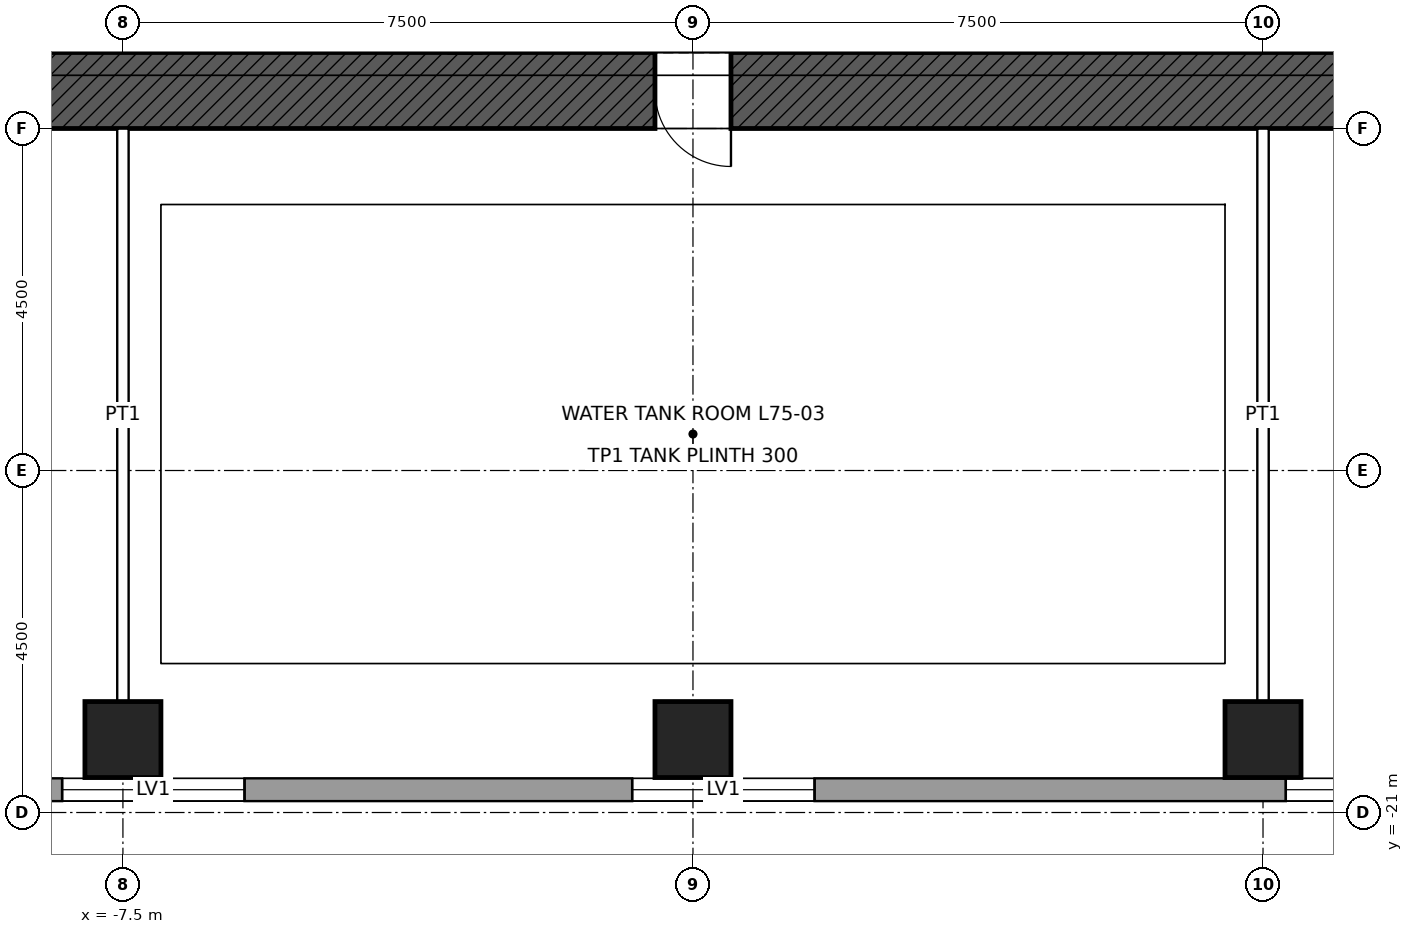
"""IFC4 building model, lengths in metres.
Left out: names, types, materials, properties, quantities, classifications, styles, units other than length and angle.
Written with IfcOpenShell. Run it as: python <this file> out.ifc"""

import sys

from ifc_helpers import new_model, si_unit, direction, frame, frame_2d, origin, origin_2d, place, context, subcontext, project, spatial, rectangle, hollow_rectangle, extrude, element, fill, save


model = new_model("IFC4")
c1 = context("Model", 3, precision=1e-05, world=origin(), true_north=direction((0.0, 1.0)))
c2 = subcontext(c1, "Body", "Model", "MODEL_VIEW")
j1 = project(units=[si_unit("LENGTHUNIT", "METRE"), si_unit("PLANEANGLEUNIT", "RADIAN")], contexts=[c1])
p1 = place(None, origin())
s1 = spatial("IfcSite", under=j1, at=p1, CompositionType="ELEMENT")
p2 = place(p1, origin())
s2 = spatial("IfcBuilding", under=s1, at=p2, CompositionType="ELEMENT")
p3 = place(p2, frame((0.0, 0.0, 335.9)))
s3 = spatial("IfcBuildingStorey", under=s2, at=p3, CompositionType="ELEMENT", Elevation=335.9)
for number, where, z_axis, x_axis in (
    (1, (7.5, -20.04, 0.0), (0.0, 0.0, 1.0), (1.0, 0.0, 0.0)),
    (2, (0.0, -20.04, 0.0), (0.0, 0.0, 1.0), (1.0, 0.0, 0.0)),
    (3, (-7.5, -20.04, 0.0), (0.0, 0.0, 1.0), (1.0, 0.0, 0.0)),
):
    element("IfcColumn", number, at=place(p3, frame(where, z_axis=z_axis, x_axis=x_axis)), inside=s3, PredefinedType="COLUMN", context=c2, shape_type="SweptSolid", body=[
        extrude(hollow_rectangle(XDim=1.0, YDim=1.0, WallThickness=0.075, at=origin_2d()), origin(), (0.0, 0.0, 1.0), 6.0),
    ])
p4 = place(p3, frame((12.0, -11.5, 0.0), z_axis=(0.0, 0.0, 1.0), x_axis=(-1.0, 0.0, 0.0)))
e4 = element("IfcWall", 4, at=p4, inside=s3, PredefinedType="SHEAR", context=c2, shape_type="SweptSolid", body=[
    extrude(rectangle(XDim=24.0, YDim=1.0, at=frame_2d((12.0, 0.0))), origin(), (0.0, 0.0, 1.0), 6.0),
])
p5 = place(p4, frame((11.5, 0.0, 0.0)))
e5 = element("IfcOpeningElement", 5, at=p5, cuts=e4, PredefinedType="OPENING", context=c2, shape_type="SweptSolid", body=[
    extrude(rectangle(XDim=1.0, YDim=2.1, at=frame_2d((0.5, 1.05))), frame((0.0, 0.51, 0.0), z_axis=(0.0, -1.0, 0.0), x_axis=(1.0, 0.0, 0.0)), (0.0, 0.0, 1.0), 1.02),
])
p6 = place(p4, frame((1.0, 0.0, 0.0)))
e6 = element("IfcOpeningElement", 6, at=p6, cuts=e4, PredefinedType="OPENING", context=c2, shape_type="SweptSolid", body=[
    extrude(rectangle(XDim=1.0, YDim=2.4, at=frame_2d((0.5, 1.2))), frame((0.0, 0.51, 0.0), z_axis=(0.0, -1.0, 0.0), x_axis=(1.0, 0.0, 0.0)), (0.0, 0.0, 1.0), 1.02),
])
p7 = place(p3, frame((13.2, -20.7, 0.0), z_axis=(0.0, 0.0, 1.0), x_axis=(-1.0, 0.0, 0.0)))
e7 = element("IfcWall", 7, at=p7, inside=s3, PredefinedType="SOLIDWALL", context=c2, shape_type="SweptSolid", body=[
    extrude(rectangle(XDim=26.4, YDim=0.3, at=frame_2d((13.2, 0.0))), origin(), (0.0, 0.0, 1.0), 5.8),
])
p8 = place(p7, frame((3.0, 0.0, 0.6)))
e8 = element("IfcOpeningElement", 8, at=p8, cuts=e7, PredefinedType="OPENING", context=c2, shape_type="SweptSolid", body=[
    extrude(rectangle(XDim=2.4, YDim=2.4, at=frame_2d((1.2, 1.2))), frame((0.0, 0.16, 0.0), z_axis=(0.0, -1.0, 0.0), x_axis=(1.0, 0.0, 0.0)), (0.0, 0.0, 1.0), 0.32),
])
p9 = place(p7, frame((11.6, 0.0, 0.6)))
e9 = element("IfcOpeningElement", 9, at=p9, cuts=e7, PredefinedType="OPENING", context=c2, shape_type="SweptSolid", body=[
    extrude(rectangle(XDim=2.4, YDim=2.4, at=frame_2d((1.2, 1.2))), frame((0.0, 0.16, 0.0), z_axis=(0.0, -1.0, 0.0), x_axis=(1.0, 0.0, 0.0)), (0.0, 0.0, 1.0), 0.32),
])
p10 = place(p7, frame((19.1, 0.0, 0.6)))
e10 = element("IfcOpeningElement", 10, at=p10, cuts=e7, PredefinedType="OPENING", context=c2, shape_type="SweptSolid", body=[
    extrude(rectangle(XDim=2.4, YDim=2.4, at=frame_2d((1.2, 1.2))), frame((0.0, 0.16, 0.0), z_axis=(0.0, -1.0, 0.0), x_axis=(1.0, 0.0, 0.0)), (0.0, 0.0, 1.0), 0.32),
])
for number, where, z_axis, x_axis in (
    (11, (-7.5, -12.0, 0.0), (0.0, 0.0, 1.0), (0.0, -1.0, 0.0)),
    (12, (7.5, -12.0, 0.0), (0.0, 0.0, 1.0), (0.0, -1.0, 0.0)),
):
    element("IfcWall", number, at=place(p3, frame(where, z_axis=z_axis, x_axis=x_axis)), inside=s3, PredefinedType="PARTITIONING", context=c2, shape_type="SweptSolid", body=[
        extrude(rectangle(XDim=7.54, YDim=0.15, at=frame_2d((3.77, 0.0))), origin(), (0.0, 0.0, 1.0), 4.998),
    ])
p11 = place(p8, origin())
e13 = element("IfcWindow", 13, at=p11, inside=s3, PartitioningType="SINGLE_PANEL", PredefinedType="WINDOW", context=c2, shape_type="SweptSolid", body=[
    extrude(rectangle(XDim=2.4, YDim=2.4, at=frame_2d((1.2, 1.2))), frame((0.0, 0.15, 0.0), z_axis=(0.0, -1.0, 0.0), x_axis=(1.0, 0.0, 0.0)), (0.0, 0.0, 1.0), 0.06),
])
fill(e8, e13)
p12 = place(p9, origin())
e14 = element("IfcWindow", 14, at=p12, inside=s3, PartitioningType="SINGLE_PANEL", PredefinedType="WINDOW", context=c2, shape_type="SweptSolid", body=[
    extrude(rectangle(XDim=2.4, YDim=2.4, at=frame_2d((1.2, 1.2))), frame((0.0, 0.15, 0.0), z_axis=(0.0, -1.0, 0.0), x_axis=(1.0, 0.0, 0.0)), (0.0, 0.0, 1.0), 0.06),
])
fill(e9, e14)
p13 = place(p10, origin())
e15 = element("IfcWindow", 15, at=p13, inside=s3, PartitioningType="SINGLE_PANEL", PredefinedType="WINDOW", context=c2, shape_type="SweptSolid", body=[
    extrude(rectangle(XDim=2.4, YDim=2.4, at=frame_2d((1.2, 1.2))), frame((0.0, 0.15, 0.0), z_axis=(0.0, -1.0, 0.0), x_axis=(1.0, 0.0, 0.0)), (0.0, 0.0, 1.0), 0.06),
])
fill(e10, e15)
p14 = place(p5, origin())
e16 = element("IfcDoor", 16, at=p14, inside=s3, OperationType="SINGLE_SWING_LEFT", PredefinedType="DOOR", context=c2, shape_type="SweptSolid", body=[
    extrude(rectangle(XDim=1.0, YDim=2.1, at=frame_2d((0.5, 1.05))), frame((0.0, 0.485, 0.0), z_axis=(0.0, -1.0, 0.0), x_axis=(1.0, 0.0, 0.0)), (0.0, 0.0, 1.0), 0.05),
])
fill(e5, e16)
save(model, sys.argv[1])
